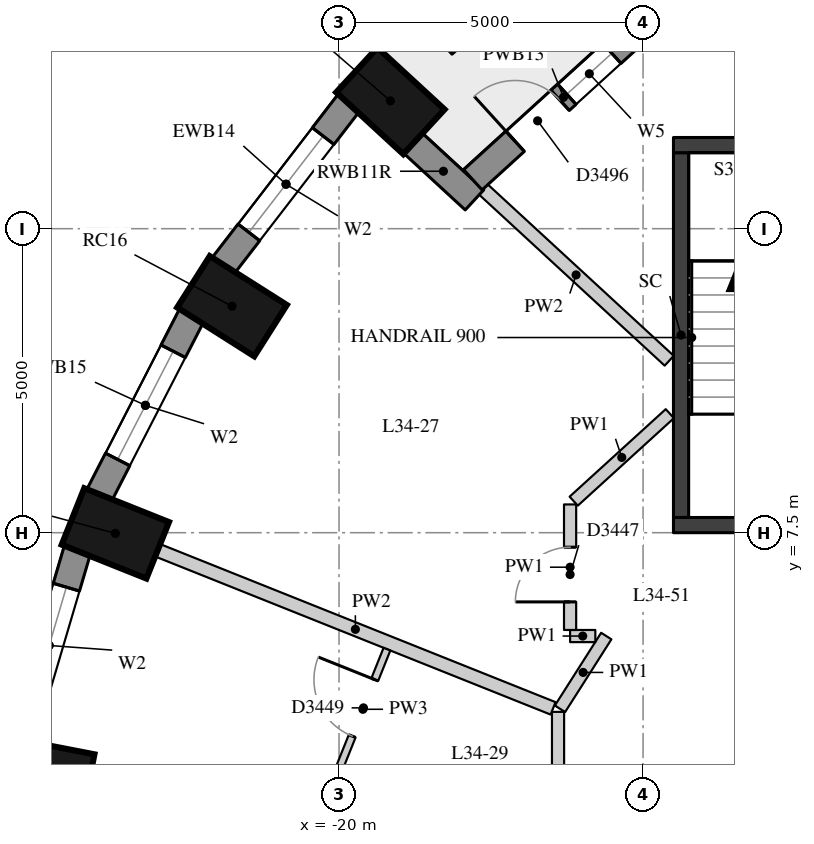
"""IFC4 building model, lengths in metres.
Left out: names, types, materials, properties, quantities, classifications, styles, units other than length and angle.
Written with IfcOpenShell. Run it as: python <this file> out.ifc"""

import sys

from ifc_helpers import new_model, si_unit, direction, frame, frame_2d, origin, origin_2d, place, context, subcontext, project, spatial, rectangle, extrude, element, fill, save


model = new_model("IFC4")
c1 = context("Model", 3, precision=1e-05, world=origin(), true_north=direction((0.0, 1.0)))
c2 = subcontext(c1, "Body", "Model", "MODEL_VIEW")
j1 = project(units=[si_unit("LENGTHUNIT", "METRE"), si_unit("PLANEANGLEUNIT", "RADIAN")], contexts=[c1])
p1 = place(None, origin())
s1 = spatial("IfcSite", under=j1, at=p1, CompositionType="ELEMENT")
p2 = place(p1, origin())
s2 = spatial("IfcBuilding", under=s1, at=p2, CompositionType="ELEMENT")
p3 = place(p2, frame((0.0, 0.0, 121.9)))
s3 = spatial("IfcBuildingStorey", under=s2, at=p3, CompositionType="ELEMENT", Elevation=121.9)
for number, where, z_axis, x_axis in (
    (1, (-19.156, 14.602, 0.0), (0.0, 0.0, 1.0), (-0.735, 0.678, 0.0)),
    (2, (-21.76, 11.225, 0.0), (0.0, 0.0, 1.0), (-0.845, 0.536, 0.0)),
    (3, (-23.679, 7.489, 0.0), (0.0, 0.0, 1.0), (-0.929, 0.371, 0.0)),
    (4, (-24.854, 3.507, 0.0), (0.0, 0.0, 1.0), (-0.982, 0.19, 0.0)),
):
    element("IfcColumn", number, at=place(p3, frame(where, z_axis=z_axis, x_axis=x_axis)), inside=s3, PredefinedType="COLUMN", context=c2, shape_type="SweptSolid", body=[
        extrude(rectangle(XDim=1.5, YDim=1.0, at=origin_2d()), origin(), (0.0, 0.0, 1.0), 3.3),
    ])
p4 = place(p3, frame((-19.835, 14.575, 0.0), z_axis=(0.0, 0.0, 1.0), x_axis=(-0.610693945156, -0.791866721961, 0.0)))
e5 = element("IfcWall", 5, at=p4, inside=s3, PredefinedType="SOLIDWALL", context=c2, shape_type="SweptSolid", body=[
    extrude(rectangle(XDim=3.395, YDim=0.45, at=frame_2d((1.697, 0.0))), origin(), (0.0, 0.0, 1.0), 3.02),
])
p5 = place(p4, frame((0.697, 0.0, 0.4)))
e6 = element("IfcOpeningElement", 6, at=p5, cuts=e5, PredefinedType="OPENING", context=c2, shape_type="SweptSolid", body=[
    extrude(rectangle(XDim=2.0, YDim=1.75, at=frame_2d((1.0, 0.875))), frame((0.0, 0.235, 0.0), z_axis=(0.0, -1.0, 0.0), x_axis=(1.0, 0.0, 0.0)), (0.0, 0.0, 1.0), 0.47),
])
p6 = place(p3, frame((-22.423, 11.077, 0.0), z_axis=(0.0, 0.0, 1.0), x_axis=(-0.456828186229, -0.889554949549, 0.0)))
e7 = element("IfcWall", 7, at=p6, inside=s3, PredefinedType="SOLIDWALL", context=c2, shape_type="SweptSolid", body=[
    extrude(rectangle(XDim=3.333, YDim=0.45, at=frame_2d((1.667, 0.0))), origin(), (0.0, 0.0, 1.0), 3.02),
])
p7 = place(p6, frame((0.666, 0.0, 0.4)))
e8 = element("IfcOpeningElement", 8, at=p7, cuts=e7, PredefinedType="OPENING", context=c2, shape_type="SweptSolid", body=[
    extrude(rectangle(XDim=2.0, YDim=1.75, at=frame_2d((1.0, 0.875))), frame((0.0, 0.235, 0.0), z_axis=(0.0, -1.0, 0.0), x_axis=(1.0, 0.0, 0.0)), (0.0, 0.0, 1.0), 0.47),
])
p8 = place(p3, frame((-24.302, 7.221, 0.0), z_axis=(0.0, 0.0, 1.0), x_axis=(-0.283071248438, -0.959098883488, 0.0)))
e9 = element("IfcWall", 9, at=p8, inside=s3, PredefinedType="SOLIDWALL", context=c2, shape_type="SweptSolid", body=[
    extrude(rectangle(XDim=3.286, YDim=0.45, at=frame_2d((1.643, 0.0))), origin(), (0.0, 0.0, 1.0), 3.02),
])
p9 = place(p8, frame((0.643, 0.0, 0.4)))
e10 = element("IfcOpeningElement", 10, at=p9, cuts=e9, PredefinedType="OPENING", context=c2, shape_type="SweptSolid", body=[
    extrude(rectangle(XDim=2.0, YDim=1.75, at=frame_2d((1.0, 0.875))), frame((0.0, 0.235, 0.0), z_axis=(0.0, -1.0, 0.0), x_axis=(1.0, 0.0, 0.0)), (0.0, 0.0, 1.0), 0.47),
])
p10 = place(p3, frame((-18.795, 13.916, 0.0), z_axis=(0.0, 0.0, 1.0), x_axis=(0.735395448697, -0.677638202905, 0.0)))
e11 = element("IfcWall", 11, at=p10, inside=s3, PredefinedType="SOLIDWALL", context=c2, shape_type="SweptSolid", body=[
    extrude(rectangle(XDim=1.391, YDim=0.45, at=frame_2d((0.695, 0.0))), origin(), (0.0, 0.0, 1.0), 3.02),
])
p11 = place(p3, frame((-14.818, 16.018, 0.0), z_axis=(0.0, 0.0, 1.0), x_axis=(-0.739460283824, -0.673200184675, 0.0)))
e12 = element("IfcWall", 12, at=p11, inside=s3, PredefinedType="SOLIDWALL", context=c2, shape_type="SweptSolid", body=[
    extrude(rectangle(XDim=4.031, YDim=0.45, at=frame_2d((2.016, 0.0))), origin(), (0.0, 0.0, 1.0), 3.02),
])
p12 = place(p11, frame((0.94, 0.0, 0.4)))
e13 = element("IfcOpeningElement", 13, at=p12, cuts=e12, PredefinedType="OPENING", context=c2, shape_type="SweptSolid", body=[
    extrude(rectangle(XDim=1.0, YDim=1.75, at=frame_2d((0.5, 0.875))), frame((0.0, 0.235, 0.0), z_axis=(0.0, -1.0, 0.0), x_axis=(1.0, 0.0, 0.0)), (0.0, 0.0, 1.0), 0.47),
])
p13 = place(p11, frame((2.091, 0.0, 0.0)))
e14 = element("IfcOpeningElement", 14, at=p13, cuts=e12, PredefinedType="OPENING", context=c2, shape_type="SweptSolid", body=[
    extrude(rectangle(XDim=1.0, YDim=2.15, at=frame_2d((0.5, 1.075))), frame((0.0, 0.235, 0.0), z_axis=(0.0, -1.0, 0.0), x_axis=(1.0, 0.0, 0.0)), (0.0, 0.0, 1.0), 0.47),
])
p14 = place(p3, frame((-17.044, 16.839, 0.0), z_axis=(0.0, 0.0, 1.0), x_axis=(-0.740332755969, -0.6722405897, 0.0)))
e15 = element("IfcWall", 15, at=p14, inside=s3, PredefinedType="USERDEFINED", context=c2, shape_type="SweptSolid", body=[
    extrude(rectangle(XDim=1.8, YDim=0.7, at=frame_2d((0.9, 0.0))), origin(), (0.0, 0.0, 1.0), 0.75),
])
p15 = place(p3, frame((-14.375, 7.75, -0.28), z_axis=(0.0, 0.0, 1.0), x_axis=(0.0, 1.0, 0.0)))
e16 = element("IfcWall", 16, at=p15, inside=s3, PredefinedType="SHEAR", context=c2, shape_type="SweptSolid", body=[
    extrude(rectangle(XDim=6.0, YDim=0.25, at=frame_2d((3.0, 0.0))), origin(), (0.0, 0.0, 1.0), 3.3),
])
for number, where, z_axis, x_axis in (
    (17, (-14.5, 13.875, -0.28), (0.0, 0.0, 1.0), (1.0, 0.0, 0.0)),
    (18, (-14.5, 7.625, -0.28), (0.0, 0.0, 1.0), (1.0, 0.0, 0.0)),
):
    element("IfcWall", number, at=place(p3, frame(where, z_axis=z_axis, x_axis=x_axis)), inside=s3, PredefinedType="SHEAR", context=c2, shape_type="SweptSolid", body=[
        extrude(rectangle(XDim=5.2, YDim=0.25, at=frame_2d((2.6, 0.0))), origin(), (0.0, 0.0, 1.0), 3.3),
    ])
p16 = place(p3, frame((-16.398, -5.693, 0.0), z_axis=(0.0, 0.0, 1.0), x_axis=(0.0, 1.0, 0.0)))
e19 = element("IfcWall", 19, at=p16, inside=s3, PredefinedType="PARTITIONING", context=c2, shape_type="SweptSolid", body=[
    extrude(rectangle(XDim=10.246, YDim=0.2, at=frame_2d((5.123, 0.0))), origin(), (0.0, 0.0, 1.0), 3.02),
])
p17 = place(p16, frame((6.539, 0.0, 0.0)))
e20 = element("IfcOpeningElement", 20, at=p17, cuts=e19, PredefinedType="OPENING", context=c2, shape_type="SweptSolid", body=[
    extrude(rectangle(XDim=1.1, YDim=2.1, at=frame_2d((0.55, 1.05))), frame((0.0, 0.11, 0.0), z_axis=(0.0, -1.0, 0.0), x_axis=(1.0, 0.0, 0.0)), (0.0, 0.0, 1.0), 0.22),
])
p18 = place(p16, frame((3.337, 0.0, 0.0)))
e21 = element("IfcOpeningElement", 21, at=p18, cuts=e19, PredefinedType="OPENING", context=c2, shape_type="SweptSolid", body=[
    extrude(rectangle(XDim=1.1, YDim=2.1, at=frame_2d((0.55, 1.05))), frame((0.0, 0.11, 0.0), z_axis=(0.0, -1.0, 0.0), x_axis=(1.0, 0.0, 0.0)), (0.0, 0.0, 1.0), 0.22),
])
p19 = place(p3, frame((-16.366, 4.604, 0.0), z_axis=(0.0, 0.0, 1.0), x_axis=(0.536775234189, 0.843725279911, 0.0)))
e22 = element("IfcWall", 22, at=p19, inside=s3, PredefinedType="PARTITIONING", context=c2, shape_type="SweptSolid", body=[
    extrude(rectangle(XDim=1.418, YDim=0.2, at=frame_2d((0.709, 0.0))), origin(), (0.0, 0.0, 1.0), 3.02),
])
p20 = place(p3, frame((-15.785, 5.8, 0.0), z_axis=(0.0, 0.0, 1.0), x_axis=(-1.0, 0.0, 0.0)))
e23 = element("IfcWall", 23, at=p20, inside=s3, PredefinedType="PARTITIONING", context=c2, shape_type="SweptSolid", body=[
    extrude(rectangle(XDim=0.415, YDim=0.2, at=frame_2d((0.208, 0.0))), origin(), (0.0, 0.0, 1.0), 3.02),
])
p21 = place(p3, frame((-16.2, 5.9, 0.0), z_axis=(0.0, 0.0, 1.0), x_axis=(0.0, 1.0, 0.0)))
e24 = element("IfcWall", 24, at=p21, inside=s3, PredefinedType="PARTITIONING", context=c2, shape_type="SweptSolid", body=[
    extrude(rectangle(XDim=2.065, YDim=0.2, at=frame_2d((1.032, 0.0))), origin(), (0.0, 0.0, 1.0), 3.02),
])
p22 = place(p21, frame((0.462, 0.0, 0.0)))
e25 = element("IfcOpeningElement", 25, at=p22, cuts=e24, PredefinedType="OPENING", context=c2, shape_type="SweptSolid", body=[
    extrude(rectangle(XDim=0.9, YDim=2.1, at=frame_2d((0.45, 1.05))), frame((0.0, 0.11, 0.0), z_axis=(0.0, -1.0, 0.0), x_axis=(1.0, 0.0, 0.0)), (0.0, 0.0, 1.0), 0.22),
])
p23 = place(p3, frame((-16.14, 8.019, 0.0), z_axis=(0.0, 0.0, 1.0), x_axis=(0.739392120684, 0.673275049197, 0.0)))
e26 = element("IfcWall", 26, at=p23, inside=s3, PredefinedType="PARTITIONING", context=c2, shape_type="SweptSolid", body=[
    extrude(rectangle(XDim=2.138, YDim=0.2, at=frame_2d((1.069, 0.0))), origin(), (0.0, 0.0, 1.0), 3.02),
])
p24 = place(p3, frame((-17.633, 13.151, 0.0), z_axis=(0.0, 0.0, 1.0), x_axis=(0.73535370522, -0.677683501511, 0.0)))
e27 = element("IfcWall", 27, at=p24, inside=s3, PredefinedType="PARTITIONING", context=c2, shape_type="SweptSolid", body=[
    extrude(rectangle(XDim=4.166, YDim=0.22, at=frame_2d((2.083, 0.0))), origin(), (0.0, 0.0, 1.0), 3.02),
])
p25 = place(p3, frame((-22.983, 7.21, 0.0), z_axis=(0.0, 0.0, 1.0), x_axis=(0.928548801607, -0.371210348771, 0.0)))
e28 = element("IfcWall", 28, at=p25, inside=s3, PredefinedType="PARTITIONING", context=c2, shape_type="SweptSolid", body=[
    extrude(rectangle(XDim=7.003, YDim=0.22, at=frame_2d((3.501, 0.0))), origin(), (0.0, 0.0, 1.0), 3.02),
])
p26 = place(p3, frame((-20.003, 3.607, 0.0), z_axis=(0.0, 0.0, 1.0), x_axis=(0.371351153758, 0.928492498948, 0.0)))
e29 = element("IfcWall", 29, at=p26, inside=s3, PredefinedType="PARTITIONING", context=c2, shape_type="SweptSolid", body=[
    extrude(rectangle(XDim=2.13, YDim=0.12, at=frame_2d((1.065, 0.0))), origin(), (0.0, 0.0, 1.0), 3.02),
])
p27 = place(p26, frame((0.59, 0.0, 0.0)))
e30 = element("IfcOpeningElement", 30, at=p27, cuts=e29, PredefinedType="OPENING", context=c2, shape_type="SweptSolid", body=[
    extrude(rectangle(XDim=1.0, YDim=2.1, at=frame_2d((0.5, 1.05))), frame((0.0, 0.07, 0.0), z_axis=(0.0, -1.0, 0.0), x_axis=(1.0, 0.0, 0.0)), (0.0, 0.0, 1.0), 0.14),
])
p28 = place(p3, frame((-13.554, 0.0, 0.0), z_axis=(0.0, 0.0, 1.0), x_axis=(0.382730523909, 0.923860025149, 0.0)))
e31 = element("IfcWall", 31, at=p28, inside=s3, PredefinedType="PARTITIONING", context=c2, shape_type="SweptSolid", body=[
    extrude(rectangle(XDim=4.251, YDim=0.1, at=frame_2d((2.125, 0.0))), origin(), (0.0, 0.0, 1.0), 3.02),
])
p29 = place(p5, origin())
e32 = element("IfcWindow", 32, at=p29, inside=s3, PartitioningType="SINGLE_PANEL", PredefinedType="WINDOW", context=c2, shape_type="SweptSolid", body=[
    extrude(rectangle(XDim=2.0, YDim=1.75, at=frame_2d((1.0, 0.875))), frame((0.0, 0.035, 0.0), z_axis=(0.0, -1.0, 0.0), x_axis=(1.0, 0.0, 0.0)), (0.0, 0.0, 1.0), 0.06),
])
fill(e6, e32)
p30 = place(p7, origin())
e33 = element("IfcWindow", 33, at=p30, inside=s3, PartitioningType="SINGLE_PANEL", PredefinedType="WINDOW", context=c2, shape_type="SweptSolid", body=[
    extrude(rectangle(XDim=2.0, YDim=1.75, at=frame_2d((1.0, 0.875))), frame((0.0, 0.035, 0.0), z_axis=(0.0, -1.0, 0.0), x_axis=(1.0, 0.0, 0.0)), (0.0, 0.0, 1.0), 0.06),
])
fill(e8, e33)
p31 = place(p9, origin())
e34 = element("IfcWindow", 34, at=p31, inside=s3, PartitioningType="SINGLE_PANEL", PredefinedType="WINDOW", context=c2, shape_type="SweptSolid", body=[
    extrude(rectangle(XDim=2.0, YDim=1.75, at=frame_2d((1.0, 0.875))), frame((0.0, 0.035, 0.0), z_axis=(0.0, -1.0, 0.0), x_axis=(1.0, 0.0, 0.0)), (0.0, 0.0, 1.0), 0.06),
])
fill(e10, e34)
p32 = place(p12, origin())
e35 = element("IfcWindow", 35, at=p32, inside=s3, PartitioningType="SINGLE_PANEL", PredefinedType="WINDOW", context=c2, shape_type="SweptSolid", body=[
    extrude(rectangle(XDim=1.0, YDim=1.75, at=frame_2d((0.5, 0.875))), frame((0.0, 0.035, 0.0), z_axis=(0.0, -1.0, 0.0), x_axis=(1.0, 0.0, 0.0)), (0.0, 0.0, 1.0), 0.06),
])
fill(e13, e35)
p33 = place(p13, frame((1.0, 0.0, 0.0), z_axis=(0.0, 0.0, 1.0), x_axis=(-1.0, 0.0, 0.0)))
e36 = element("IfcDoor", 36, at=p33, inside=s3, OperationType="SINGLE_SWING_LEFT", PredefinedType="DOOR", context=c2, shape_type="SweptSolid", body=[
    extrude(rectangle(XDim=1.0, YDim=2.15, at=frame_2d((0.5, 1.075))), frame((0.0, 0.075, 0.0), z_axis=(0.0, -1.0, 0.0), x_axis=(1.0, 0.0, 0.0)), (0.0, 0.0, 1.0), 0.05),
])
fill(e14, e36)
p34 = place(p22, origin())
e37 = element("IfcDoor", 37, at=p34, inside=s3, OperationType="SINGLE_SWING_LEFT", PredefinedType="DOOR", context=c2, shape_type="SweptSolid", body=[
    extrude(rectangle(XDim=0.9, YDim=2.1, at=frame_2d((0.45, 1.05))), frame((0.0, 0.025, 0.0), z_axis=(0.0, -1.0, 0.0), x_axis=(1.0, 0.0, 0.0)), (0.0, 0.0, 1.0), 0.05),
])
fill(e25, e37)
p35 = place(p27, origin())
e38 = element("IfcDoor", 38, at=p35, inside=s3, OperationType="SINGLE_SWING_RIGHT", PredefinedType="DOOR", context=c2, shape_type="SweptSolid", body=[
    extrude(rectangle(XDim=1.0, YDim=2.1, at=frame_2d((0.5, 1.05))), frame((0.0, 0.025, 0.0), z_axis=(0.0, -1.0, 0.0), x_axis=(1.0, 0.0, 0.0)), (0.0, 0.0, 1.0), 0.05),
])
fill(e30, e38)
save(model, sys.argv[1])
